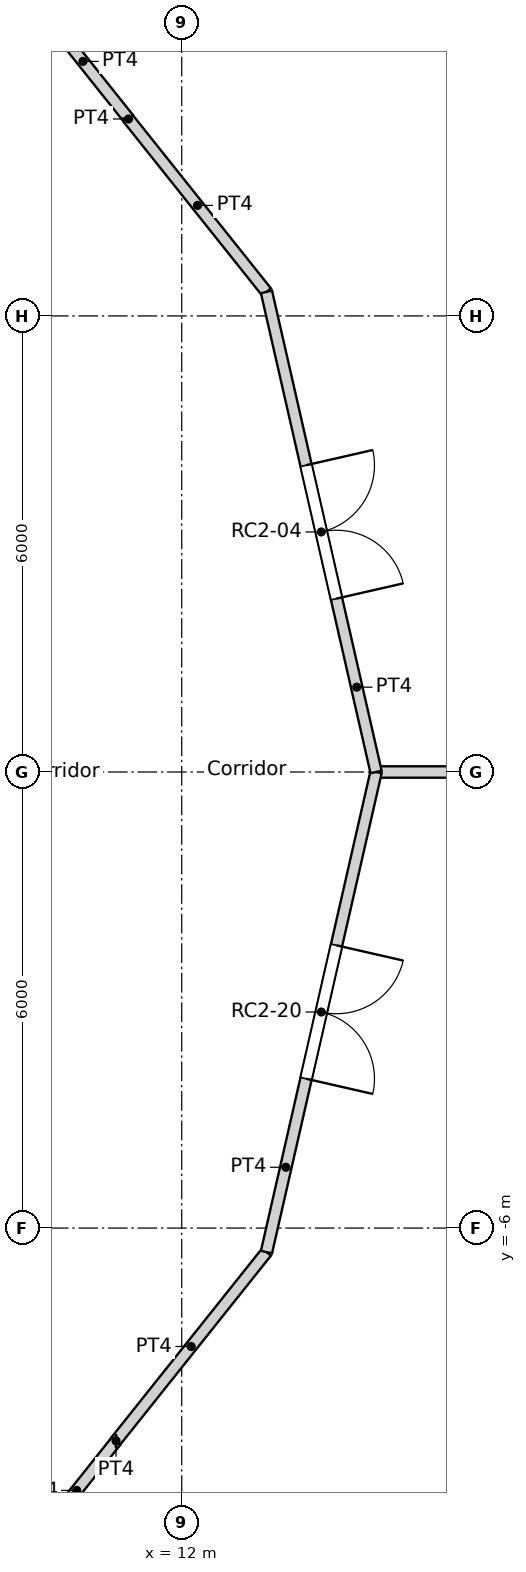
"""IFC4 building model, lengths in metres.
Left out: names, types, materials, properties, quantities, classifications, styles, units other than length and angle.
Written with IfcOpenShell. Run it as: python <this file> out.ifc"""

import sys

from ifc_helpers import new_model, si_unit, direction, frame, frame_2d, origin, place, context, subcontext, project, spatial, rectangle, extrude, element, fill, save


model = new_model("IFC4")
c1 = context("Model", 3, precision=1e-05, world=origin(), true_north=direction((0.0, 1.0)))
c2 = subcontext(c1, "Body", "Model", "MODEL_VIEW")
j1 = project(units=[si_unit("LENGTHUNIT", "METRE"), si_unit("PLANEANGLEUNIT", "RADIAN")], contexts=[c1])
p1 = place(None, origin())
s1 = spatial("IfcSite", under=j1, at=p1, CompositionType="ELEMENT")
p2 = place(p1, origin())
s2 = spatial("IfcBuilding", under=s1, at=p2, CompositionType="ELEMENT")
p3 = place(p2, frame((0.0, 0.0, 241.8)))
s3 = spatial("IfcBuildingStorey", under=s2, at=p3, CompositionType="ELEMENT", Elevation=241.8)
p4 = place(p3, frame((10.101, 10.101, 0.0), z_axis=(0.0, 0.0, 1.0), x_axis=(0.623130947784, -0.782117524362, 0.0)))
e1 = element("IfcWall", 1, at=p4, inside=s3, PredefinedType="PARTITIONING", context=c2, shape_type="SweptSolid", body=[
    extrude(rectangle(XDim=1.924, YDim=0.15, at=frame_2d((0.962, 0.0))), origin(), (0.0, 0.0, 1.0), 3.25),
])
p5 = place(p3, frame((11.3, 8.586, 0.0), z_axis=(0.0, 0.0, 1.0), x_axis=(0.0, 1.0, 0.0)))
e2 = element("IfcWall", 2, at=p5, inside=s3, PredefinedType="PARTITIONING", context=c2, shape_type="SweptSolid", body=[
    extrude(rectangle(XDim=0.01, YDim=0.15, at=frame_2d((0.005, 0.0))), origin(), (0.0, 0.0, 1.0), 3.25),
])
p6 = place(p3, frame((11.137, -8.8, 0.0), z_axis=(0.0, 0.0, 1.0), x_axis=(-1.0, 0.0, 0.0)))
e3 = element("IfcWall", 3, at=p6, inside=s3, PredefinedType="PARTITIONING", context=c2, shape_type="SweptSolid", body=[
    extrude(rectangle(XDim=0.003, YDim=0.15, at=frame_2d((0.001, 0.0))), origin(), (0.0, 0.0, 1.0), 3.25),
])
p7 = place(p3, frame((10.101, -10.101, 0.0), z_axis=(0.0, 0.0, 1.0), x_axis=(0.623098344652, 0.782143498913, 0.0)))
e4 = element("IfcWall", 4, at=p7, inside=s3, PredefinedType="PARTITIONING", context=c2, shape_type="SweptSolid", body=[
    extrude(rectangle(XDim=1.661, YDim=0.15, at=frame_2d((0.831, 0.0))), origin(), (0.0, 0.0, 1.0), 3.25),
])
p8 = place(p3, frame((11.3, 8.592, 0.0), z_axis=(0.0, 0.0, 1.0), x_axis=(0.623446514299, -0.781866001185, 0.0)))
e5 = element("IfcWall", 5, at=p8, inside=s3, PredefinedType="PARTITIONING", context=c2, shape_type="SweptSolid", body=[
    extrude(rectangle(XDim=2.911, YDim=0.15, at=frame_2d((1.456, 0.0))), origin(), (0.0, 0.0, 1.0), 3.25),
])
p9 = place(p3, frame((13.115, 6.316, 0.0), z_axis=(0.0, 0.0, 1.0), x_axis=(0.222568978642, -0.97491694505, 0.0)))
e6 = element("IfcWall", 6, at=p9, inside=s3, PredefinedType="PARTITIONING", context=c2, shape_type="SweptSolid", body=[
    extrude(rectangle(XDim=6.479, YDim=0.15, at=frame_2d((3.239, 0.0))), origin(), (0.0, 0.0, 1.0), 3.25),
])
p10 = place(p9, frame((2.339, 0.0, 0.0)))
e7 = element("IfcOpeningElement", 7, at=p10, cuts=e6, PredefinedType="OPENING", context=c2, shape_type="SweptSolid", body=[
    extrude(rectangle(XDim=1.8, YDim=2.1, at=frame_2d((0.9, 1.05))), frame((0.0, 0.075, 0.0), z_axis=(0.0, -1.0, 0.0), x_axis=(1.0, 0.0, 0.0)), (0.0, 0.0, 1.0), 0.15),
])
p11 = place(p3, frame((13.115, -6.316, 0.0), z_axis=(0.0, 0.0, 1.0), x_axis=(0.222568978642, 0.97491694505, 0.0)))
e8 = element("IfcWall", 8, at=p11, inside=s3, PredefinedType="PARTITIONING", context=c2, shape_type="SweptSolid", body=[
    extrude(rectangle(XDim=6.479, YDim=0.15, at=frame_2d((3.239, 0.0))), origin(), (0.0, 0.0, 1.0), 3.25),
])
p12 = place(p11, frame((2.34, 0.0, 0.0)))
e9 = element("IfcOpeningElement", 9, at=p12, cuts=e8, PredefinedType="OPENING", context=c2, shape_type="SweptSolid", body=[
    extrude(rectangle(XDim=1.8, YDim=2.1, at=frame_2d((0.9, 1.05))), frame((0.0, 0.075, 0.0), z_axis=(0.0, -1.0, 0.0), x_axis=(1.0, 0.0, 0.0)), (0.0, 0.0, 1.0), 0.15),
])
p13 = place(p3, frame((11.134, -8.8, 0.0), z_axis=(0.0, 0.0, 1.0), x_axis=(0.623476099415, 0.781842409606, 0.0)))
e10 = element("IfcWall", 10, at=p13, inside=s3, PredefinedType="PARTITIONING", context=c2, shape_type="SweptSolid", body=[
    extrude(rectangle(XDim=3.177, YDim=0.15, at=frame_2d((1.589, 0.0))), origin(), (0.0, 0.0, 1.0), 3.25),
])
p14 = place(p3, frame((14.557, 0.0, 0.0), z_axis=(0.0, 0.0, 1.0), x_axis=(1.0, 0.0, 0.0)))
e11 = element("IfcWall", 11, at=p14, inside=s3, PredefinedType="PARTITIONING", context=c2, shape_type="SweptSolid", body=[
    extrude(rectangle(XDim=5.214, YDim=0.15, at=frame_2d((2.607, 0.0))), origin(), (0.0, 0.0, 1.0), 3.25),
])
p15 = place(p10, origin())
e12 = element("IfcDoor", 12, at=p15, inside=s3, OperationType="DOUBLE_DOOR_SINGLE_SWING", PredefinedType="DOOR", context=c2, shape_type="SweptSolid", body=[
    extrude(rectangle(XDim=1.8, YDim=2.1, at=frame_2d((0.9, 1.05))), frame((0.0, 0.025, 0.0), z_axis=(0.0, -1.0, 0.0), x_axis=(1.0, 0.0, 0.0)), (0.0, 0.0, 1.0), 0.05),
])
fill(e7, e12)
p16 = place(p12, origin())
e13 = element("IfcDoor", 13, at=p16, inside=s3, OperationType="DOUBLE_DOOR_SINGLE_SWING", PredefinedType="DOOR", context=c2, shape_type="SweptSolid", body=[
    extrude(rectangle(XDim=1.8, YDim=2.1, at=frame_2d((0.9, 1.05))), frame((0.0, 0.025, 0.0), z_axis=(0.0, -1.0, 0.0), x_axis=(1.0, 0.0, 0.0)), (0.0, 0.0, 1.0), 0.05),
])
fill(e9, e13)
save(model, sys.argv[1])
